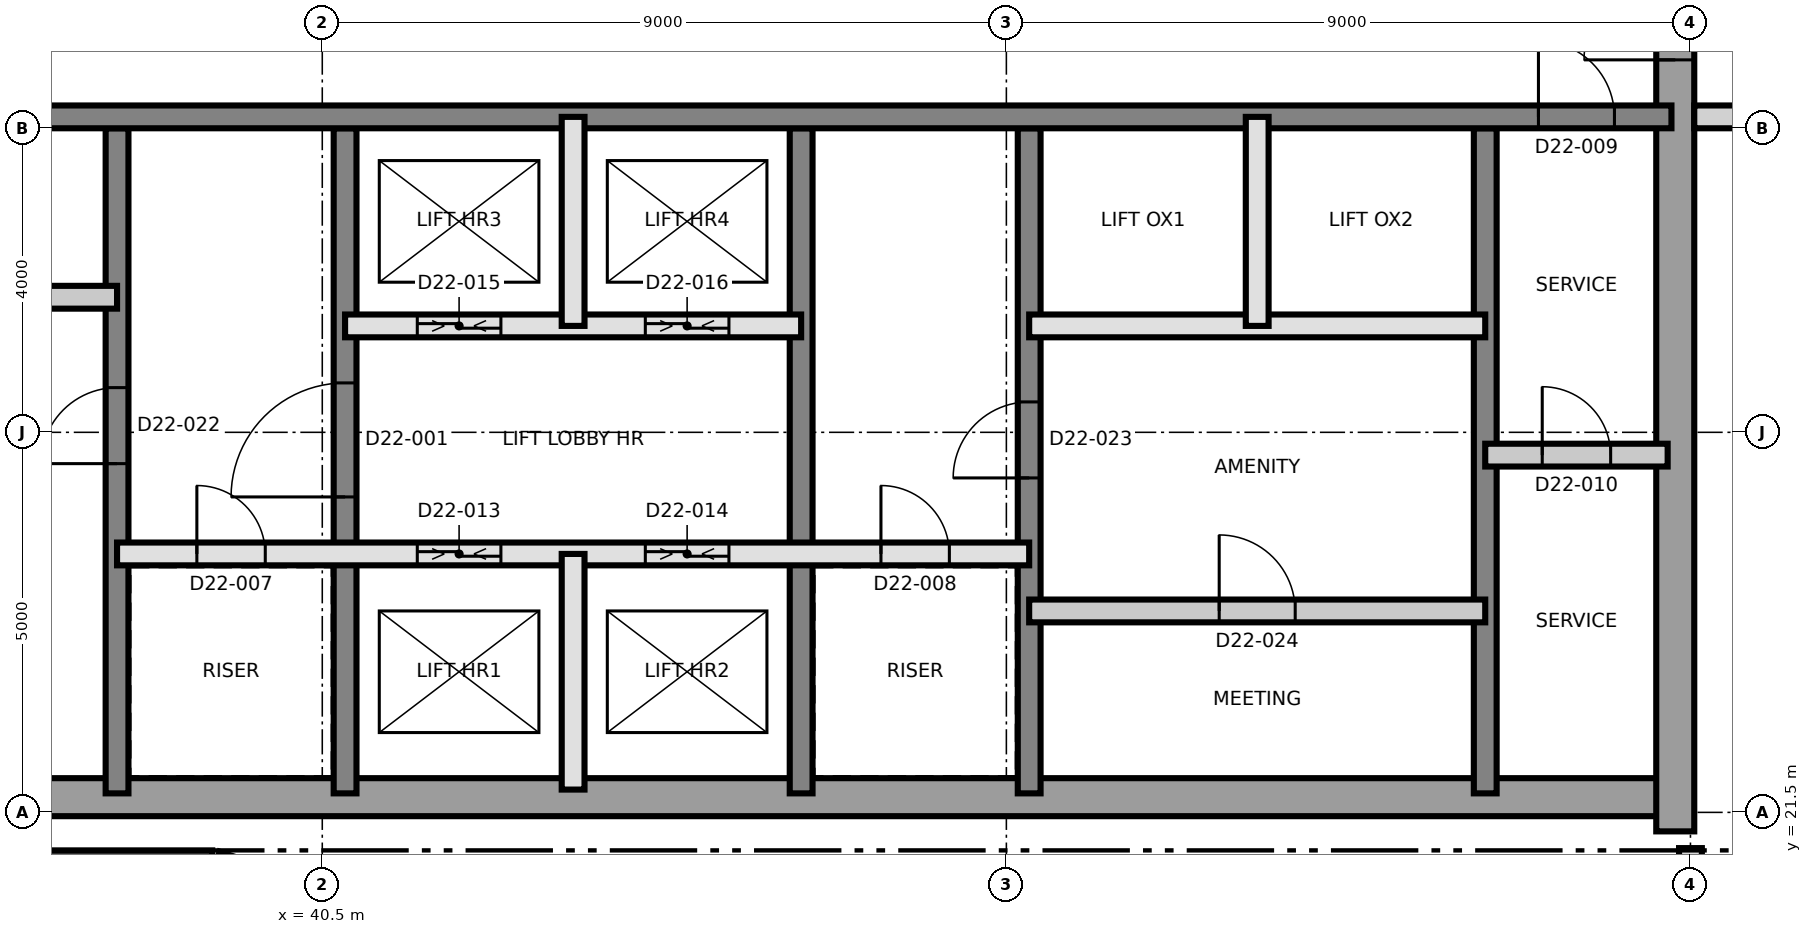
"""IFC4 building model, lengths in metres.
Left out: names, types, materials, properties, quantities, classifications, styles, units other than length and angle.
Written with IfcOpenShell. Run it as: python <this file> out.ifc"""

import sys

from ifc_helpers import new_model, si_unit, direction, frame, frame_2d, origin, place, context, subcontext, project, spatial, rectangle, extrude, element, fill, save


model = new_model("IFC4")
c1 = context("Model", 3, precision=1e-05, world=origin(), true_north=direction((0.0, 1.0)))
c2 = subcontext(c1, "Body", "Model", "MODEL_VIEW")
j1 = project(units=[si_unit("LENGTHUNIT", "METRE"), si_unit("PLANEANGLEUNIT", "RADIAN")], contexts=[c1])
p1 = place(None, origin())
s1 = spatial("IfcSite", under=j1, at=p1, CompositionType="ELEMENT")
p2 = place(p1, origin())
s2 = spatial("IfcBuilding", under=s1, at=p2, CompositionType="ELEMENT")
p3 = place(p2, frame((0.0, 0.0, 199.5)))
s3 = spatial("IfcBuildingStorey", under=s2, at=p3, CompositionType="ELEMENT", Elevation=199.5)
p4 = place(p3, frame((31.25, 21.7, 0.0), z_axis=(0.0, 0.0, 1.0), x_axis=(1.0, 0.0, 0.0)))
e1 = element("IfcWall", 1, at=p4, inside=s3, PredefinedType="SHEAR", context=c2, shape_type="SweptSolid", body=[
    extrude(rectangle(XDim=27.0, YDim=0.5, at=frame_2d((13.5, 0.0))), origin(), (0.0, 0.0, 1.0), 3.7),
])
p5 = place(p3, frame((58.3, 21.25, 0.0), z_axis=(0.0, 0.0, 1.0), x_axis=(0.0, 1.0, 0.0)))
e2 = element("IfcWall", 2, at=p5, inside=s3, PredefinedType="SHEAR", context=c2, shape_type="SweptSolid", body=[
    extrude(rectangle(XDim=18.5, YDim=0.5, at=frame_2d((9.25, 0.0))), origin(), (0.0, 0.0, 1.0), 3.7),
])
p6 = place(p5, frame((10.15, 0.0, 0.0)))
e3 = element("IfcOpeningElement", 3, at=p6, cuts=e2, PredefinedType="OPENING", context=c2, shape_type="SweptSolid", body=[
    extrude(rectangle(XDim=1.2, YDim=2.1, at=frame_2d((0.6, 1.05))), frame((0.0, 0.26, 0.0), z_axis=(0.0, -1.0, 0.0), x_axis=(1.0, 0.0, 0.0)), (0.0, 0.0, 1.0), 0.52),
])
p7 = place(p3, frame((37.8, 21.75, 0.0), z_axis=(0.0, 0.0, 1.0), x_axis=(0.0, 1.0, 0.0)))
e4 = element("IfcWall", 4, at=p7, inside=s3, PredefinedType="SHEAR", context=c2, shape_type="SweptSolid", body=[
    extrude(rectangle(XDim=8.75, YDim=0.3, at=frame_2d((4.375, 0.0))), origin(), (0.0, 0.0, 1.0), 3.7),
])
p8 = place(p7, frame((4.338, 0.0, 0.0)))
e5 = element("IfcOpeningElement", 5, at=p8, cuts=e4, PredefinedType="OPENING", context=c2, shape_type="SweptSolid", body=[
    extrude(rectangle(XDim=1.0, YDim=2.1, at=frame_2d((0.5, 1.05))), frame((0.0, 0.16, 0.0), z_axis=(0.0, -1.0, 0.0), x_axis=(1.0, 0.0, 0.0)), (0.0, 0.0, 1.0), 0.32),
])
p9 = place(p3, frame((40.8, 21.75, 0.0), z_axis=(0.0, 0.0, 1.0), x_axis=(0.0, 1.0, 0.0)))
e6 = element("IfcWall", 6, at=p9, inside=s3, PredefinedType="SHEAR", context=c2, shape_type="SweptSolid", body=[
    extrude(rectangle(XDim=8.75, YDim=0.3, at=frame_2d((4.375, 0.0))), origin(), (0.0, 0.0, 1.0), 3.7),
])
p10 = place(p9, frame((3.9, 0.0, 0.0)))
e7 = element("IfcOpeningElement", 7, at=p10, cuts=e6, PredefinedType="OPENING", context=c2, shape_type="SweptSolid", body=[
    extrude(rectangle(XDim=1.5, YDim=2.1, at=frame_2d((0.75, 1.05))), frame((0.0, 0.16, 0.0), z_axis=(0.0, -1.0, 0.0), x_axis=(1.0, 0.0, 0.0)), (0.0, 0.0, 1.0), 0.32),
])
p11 = place(p3, frame((46.8, 21.75, 0.0), z_axis=(0.0, 0.0, 1.0), x_axis=(0.0, 1.0, 0.0)))
e8 = element("IfcWall", 8, at=p11, inside=s3, PredefinedType="SHEAR", context=c2, shape_type="SweptSolid", body=[
    extrude(rectangle(XDim=8.75, YDim=0.3, at=frame_2d((4.375, 0.0))), origin(), (0.0, 0.0, 1.0), 3.7),
])
p12 = place(p3, frame((49.8, 21.75, 0.0), z_axis=(0.0, 0.0, 1.0), x_axis=(0.0, 1.0, 0.0)))
e9 = element("IfcWall", 9, at=p12, inside=s3, PredefinedType="SHEAR", context=c2, shape_type="SweptSolid", body=[
    extrude(rectangle(XDim=8.75, YDim=0.3, at=frame_2d((4.375, 0.0))), origin(), (0.0, 0.0, 1.0), 3.7),
])
p13 = place(p12, frame((4.15, 0.0, 0.0)))
e10 = element("IfcOpeningElement", 10, at=p13, cuts=e9, PredefinedType="OPENING", context=c2, shape_type="SweptSolid", body=[
    extrude(rectangle(XDim=1.0, YDim=2.1, at=frame_2d((0.5, 1.05))), frame((0.0, 0.16, 0.0), z_axis=(0.0, -1.0, 0.0), x_axis=(1.0, 0.0, 0.0)), (0.0, 0.0, 1.0), 0.32),
])
p14 = place(p3, frame((55.8, 21.75, 0.0), z_axis=(0.0, 0.0, 1.0), x_axis=(0.0, 1.0, 0.0)))
e11 = element("IfcWall", 11, at=p14, inside=s3, PredefinedType="SHEAR", context=c2, shape_type="SweptSolid", body=[
    extrude(rectangle(XDim=8.75, YDim=0.3, at=frame_2d((4.375, 0.0))), origin(), (0.0, 0.0, 1.0), 3.7),
])
p15 = place(p3, frame((31.75, 30.65, 0.0), z_axis=(0.0, 0.0, 1.0), x_axis=(1.0, 0.0, 0.0)))
e12 = element("IfcWall", 12, at=p15, inside=s3, PredefinedType="SHEAR", context=c2, shape_type="SweptSolid", body=[
    extrude(rectangle(XDim=26.5, YDim=0.3, at=frame_2d((13.25, 0.0))), origin(), (0.0, 0.0, 1.0), 3.7),
])
p16 = place(p15, frame((24.75, 0.0, 0.0)))
e13 = element("IfcOpeningElement", 13, at=p16, cuts=e12, PredefinedType="OPENING", context=c2, shape_type="SweptSolid", body=[
    extrude(rectangle(XDim=1.0, YDim=2.1, at=frame_2d((0.5, 1.05))), frame((0.0, 0.16, 0.0), z_axis=(0.0, -1.0, 0.0), x_axis=(1.0, 0.0, 0.0)), (0.0, 0.0, 1.0), 0.32),
])
p17 = place(p15, frame((4.05, 0.0, 0.0)))
e14 = element("IfcOpeningElement", 14, at=p17, cuts=e12, PredefinedType="OPENING", context=c2, shape_type="SweptSolid", body=[
    extrude(rectangle(XDim=1.0, YDim=2.1, at=frame_2d((0.5, 1.05))), frame((0.0, 0.16, 0.0), z_axis=(0.0, -1.0, 0.0), x_axis=(1.0, 0.0, 0.0)), (0.0, 0.0, 1.0), 0.32),
])
p18 = place(p3, frame((31.36, 20.85, 0.0), z_axis=(0.0, 0.0, 1.0), x_axis=(1.0, 0.0, 0.0)))
e15 = element("IfcWall", 15, at=p18, inside=s3, PredefinedType="SOLIDWALL", context=c2, shape_type="SweptSolid", body=[
    extrude(rectangle(XDim=7.693, YDim=0.3, at=frame_2d((3.846, 0.0))), origin(), (0.0, 0.0, 1.0), 3.4),
])
p19 = place(p3, frame((39.101, 20.842, 0.0), z_axis=(0.0, 0.0, 1.0), x_axis=(0.946930456305, -0.32143850255, 0.0)))
e16 = element("IfcWall", 16, at=p19, inside=s3, PredefinedType="SOLIDWALL", context=c2, shape_type="SweptSolid", body=[
    extrude(rectangle(XDim=1.32, YDim=0.3, at=frame_2d((0.66, 0.0))), origin(), (0.0, 0.0, 1.0), 3.4),
])
p20 = place(p3, frame((49.8, 24.15, 0.0), z_axis=(0.0, 0.0, 1.0), x_axis=(1.0, 0.0, 0.0)))
e17 = element("IfcWall", 17, at=p20, inside=s3, PredefinedType="PARTITIONING", context=c2, shape_type="SweptSolid", body=[
    extrude(rectangle(XDim=6.0, YDim=0.3, at=frame_2d((3.0, 0.0))), origin(), (0.0, 0.0, 1.0), 3.4),
])
p21 = place(p20, frame((2.5, 0.0, 0.0)))
e18 = element("IfcOpeningElement", 18, at=p21, cuts=e17, PredefinedType="OPENING", context=c2, shape_type="SweptSolid", body=[
    extrude(rectangle(XDim=1.0, YDim=2.1, at=frame_2d((0.5, 1.05))), frame((0.0, 0.16, 0.0), z_axis=(0.0, -1.0, 0.0), x_axis=(1.0, 0.0, 0.0)), (0.0, 0.0, 1.0), 0.32),
])
p22 = place(p3, frame((37.8, 24.9, 0.0), z_axis=(0.0, 0.0, 1.0), x_axis=(1.0, 0.0, 0.0)))
e19 = element("IfcWall", 19, at=p22, inside=s3, PredefinedType="SOLIDWALL", context=c2, shape_type="SweptSolid", body=[
    extrude(rectangle(XDim=12.0, YDim=0.3, at=frame_2d((6.0, 0.0))), origin(), (0.0, 0.0, 1.0), 3.4),
])
p23 = place(p22, frame((1.05, 0.0, 0.0)))
e20 = element("IfcOpeningElement", 20, at=p23, cuts=e19, PredefinedType="OPENING", context=c2, shape_type="SweptSolid", body=[
    extrude(rectangle(XDim=0.9, YDim=2.1, at=frame_2d((0.45, 1.05))), frame((0.0, 0.16, 0.0), z_axis=(0.0, -1.0, 0.0), x_axis=(1.0, 0.0, 0.0)), (0.0, 0.0, 1.0), 0.32),
])
p24 = place(p22, frame((10.05, 0.0, 0.0)))
e21 = element("IfcOpeningElement", 21, at=p24, cuts=e19, PredefinedType="OPENING", context=c2, shape_type="SweptSolid", body=[
    extrude(rectangle(XDim=0.9, YDim=2.1, at=frame_2d((0.45, 1.05))), frame((0.0, 0.16, 0.0), z_axis=(0.0, -1.0, 0.0), x_axis=(1.0, 0.0, 0.0)), (0.0, 0.0, 1.0), 0.32),
])
p25 = place(p22, frame((3.95, 0.0, 0.0)))
e22 = element("IfcOpeningElement", 22, at=p25, cuts=e19, PredefinedType="OPENING", context=c2, shape_type="SweptSolid", body=[
    extrude(rectangle(XDim=1.1, YDim=2.4, at=frame_2d((0.55, 1.2))), frame((0.0, 0.16, 0.0), z_axis=(0.0, -1.0, 0.0), x_axis=(1.0, 0.0, 0.0)), (0.0, 0.0, 1.0), 0.32),
])
p26 = place(p22, frame((6.95, 0.0, 0.0)))
e23 = element("IfcOpeningElement", 23, at=p26, cuts=e19, PredefinedType="OPENING", context=c2, shape_type="SweptSolid", body=[
    extrude(rectangle(XDim=1.1, YDim=2.4, at=frame_2d((0.55, 1.2))), frame((0.0, 0.16, 0.0), z_axis=(0.0, -1.0, 0.0), x_axis=(1.0, 0.0, 0.0)), (0.0, 0.0, 1.0), 0.32),
])
p27 = place(p3, frame((55.8, 26.2, 0.0), z_axis=(0.0, 0.0, 1.0), x_axis=(1.0, 0.0, 0.0)))
e24 = element("IfcWall", 24, at=p27, inside=s3, PredefinedType="PARTITIONING", context=c2, shape_type="SweptSolid", body=[
    extrude(rectangle(XDim=2.4, YDim=0.3, at=frame_2d((1.2, 0.0))), origin(), (0.0, 0.0, 1.0), 3.4),
])
p28 = place(p27, frame((0.75, 0.0, 0.0)))
e25 = element("IfcOpeningElement", 25, at=p28, cuts=e24, PredefinedType="OPENING", context=c2, shape_type="SweptSolid", body=[
    extrude(rectangle(XDim=0.9, YDim=2.1, at=frame_2d((0.45, 1.05))), frame((0.0, 0.16, 0.0), z_axis=(0.0, -1.0, 0.0), x_axis=(1.0, 0.0, 0.0)), (0.0, 0.0, 1.0), 0.32),
])
p29 = place(p3, frame((40.8, 27.9, 0.0), z_axis=(0.0, 0.0, 1.0), x_axis=(1.0, 0.0, 0.0)))
e26 = element("IfcWall", 26, at=p29, inside=s3, PredefinedType="SOLIDWALL", context=c2, shape_type="SweptSolid", body=[
    extrude(rectangle(XDim=6.0, YDim=0.3, at=frame_2d((3.0, 0.0))), origin(), (0.0, 0.0, 1.0), 3.4),
])
p30 = place(p29, frame((0.95, 0.0, 0.0)))
e27 = element("IfcOpeningElement", 27, at=p30, cuts=e26, PredefinedType="OPENING", context=c2, shape_type="SweptSolid", body=[
    extrude(rectangle(XDim=1.1, YDim=2.4, at=frame_2d((0.55, 1.2))), frame((0.0, 0.16, 0.0), z_axis=(0.0, -1.0, 0.0), x_axis=(1.0, 0.0, 0.0)), (0.0, 0.0, 1.0), 0.32),
])
p31 = place(p29, frame((3.95, 0.0, 0.0)))
e28 = element("IfcOpeningElement", 28, at=p31, cuts=e26, PredefinedType="OPENING", context=c2, shape_type="SweptSolid", body=[
    extrude(rectangle(XDim=1.1, YDim=2.4, at=frame_2d((0.55, 1.2))), frame((0.0, 0.16, 0.0), z_axis=(0.0, -1.0, 0.0), x_axis=(1.0, 0.0, 0.0)), (0.0, 0.0, 1.0), 0.32),
])
p32 = place(p3, frame((49.8, 27.9, 0.0), z_axis=(0.0, 0.0, 1.0), x_axis=(1.0, 0.0, 0.0)))
e29 = element("IfcWall", 29, at=p32, inside=s3, PredefinedType="SOLIDWALL", context=c2, shape_type="SweptSolid", body=[
    extrude(rectangle(XDim=6.0, YDim=0.3, at=frame_2d((3.0, 0.0))), origin(), (0.0, 0.0, 1.0), 3.4),
])
p33 = place(p3, frame((31.8, 28.277, 0.0), z_axis=(0.0, 0.0, 1.0), x_axis=(1.0, 0.0, 0.0)))
e30 = element("IfcWall", 30, at=p33, inside=s3, PredefinedType="PARTITIONING", context=c2, shape_type="SweptSolid", body=[
    extrude(rectangle(XDim=6.0, YDim=0.3, at=frame_2d((3.0, 0.0))), origin(), (0.0, 0.0, 1.0), 3.4),
])
p34 = place(p3, frame((43.8, 21.8, 0.0), z_axis=(0.0, 0.0, 1.0), x_axis=(0.0, 1.0, 0.0)))
e31 = element("IfcWall", 31, at=p34, inside=s3, PredefinedType="SOLIDWALL", context=c2, shape_type="SweptSolid", body=[
    extrude(rectangle(XDim=3.1, YDim=0.3, at=frame_2d((1.55, 0.0))), origin(), (0.0, 0.0, 1.0), 3.4),
])
for number, where, z_axis, x_axis in (
    (32, (43.8, 27.9, 0.0), (0.0, 0.0, 1.0), (0.0, 1.0, 0.0)),
    (33, (52.8, 27.9, 0.0), (0.0, 0.0, 1.0), (0.0, 1.0, 0.0)),
):
    element("IfcWall", number, at=place(p3, frame(where, z_axis=z_axis, x_axis=x_axis)), inside=s3, PredefinedType="SOLIDWALL", context=c2, shape_type="SweptSolid", body=[
        extrude(rectangle(XDim=2.75, YDim=0.3, at=frame_2d((1.375, 0.0))), origin(), (0.0, 0.0, 1.0), 3.4),
    ])
p35 = place(p3, frame((58.55, 30.65, 0.0), z_axis=(0.0, 0.0, 1.0), x_axis=(1.0, 0.0, 0.0)))
e34 = element("IfcWall", 34, at=p35, inside=s3, PredefinedType="PARTITIONING", context=c2, shape_type="SweptSolid", body=[
    extrude(rectangle(XDim=26.78, YDim=0.3, at=frame_2d((13.39, 0.0))), origin(), (0.0, 0.0, 1.0), 3.4),
])
p36 = place(p35, frame((1.65, 0.0, 0.0)))
e35 = element("IfcOpeningElement", 35, at=p36, cuts=e34, PredefinedType="OPENING", context=c2, shape_type="SweptSolid", body=[
    extrude(rectangle(XDim=1.2, YDim=2.1, at=frame_2d((0.6, 1.05))), frame((0.0, 0.16, 0.0), z_axis=(0.0, -1.0, 0.0), x_axis=(1.0, 0.0, 0.0)), (0.0, 0.0, 1.0), 0.32),
])
p37 = place(p35, frame((4.9, 0.0, 0.0)))
e36 = element("IfcOpeningElement", 36, at=p37, cuts=e34, PredefinedType="OPENING", context=c2, shape_type="SweptSolid", body=[
    extrude(rectangle(XDim=1.0, YDim=2.1, at=frame_2d((0.5, 1.05))), frame((0.0, 0.16, 0.0), z_axis=(0.0, -1.0, 0.0), x_axis=(1.0, 0.0, 0.0)), (0.0, 0.0, 1.0), 0.32),
])
p38 = place(p35, frame((10.085, 0.0, 0.0)))
e37 = element("IfcOpeningElement", 37, at=p38, cuts=e34, PredefinedType="OPENING", context=c2, shape_type="SweptSolid", body=[
    extrude(rectangle(XDim=1.2, YDim=2.1, at=frame_2d((0.6, 1.05))), frame((0.0, 0.16, 0.0), z_axis=(0.0, -1.0, 0.0), x_axis=(1.0, 0.0, 0.0)), (0.0, 0.0, 1.0), 0.32),
])
p39 = place(p35, frame((13.335, 0.0, 0.0)))
e38 = element("IfcOpeningElement", 38, at=p39, cuts=e34, PredefinedType="OPENING", context=c2, shape_type="SweptSolid", body=[
    extrude(rectangle(XDim=1.0, YDim=2.1, at=frame_2d((0.5, 1.05))), frame((0.0, 0.16, 0.0), z_axis=(0.0, -1.0, 0.0), x_axis=(1.0, 0.0, 0.0)), (0.0, 0.0, 1.0), 0.32),
])
p40 = place(p35, frame((19.085, 0.0, 0.0)))
e39 = element("IfcOpeningElement", 39, at=p40, cuts=e34, PredefinedType="OPENING", context=c2, shape_type="SweptSolid", body=[
    extrude(rectangle(XDim=1.2, YDim=2.1, at=frame_2d((0.6, 1.05))), frame((0.0, 0.16, 0.0), z_axis=(0.0, -1.0, 0.0), x_axis=(1.0, 0.0, 0.0)), (0.0, 0.0, 1.0), 0.32),
])
p41 = place(p35, frame((22.335, 0.0, 0.0)))
e40 = element("IfcOpeningElement", 40, at=p41, cuts=e34, PredefinedType="OPENING", context=c2, shape_type="SweptSolid", body=[
    extrude(rectangle(XDim=1.0, YDim=2.1, at=frame_2d((0.5, 1.05))), frame((0.0, 0.16, 0.0), z_axis=(0.0, -1.0, 0.0), x_axis=(1.0, 0.0, 0.0)), (0.0, 0.0, 1.0), 0.32),
])
p42 = place(p3, frame((58.5, 20.135, 0.0), z_axis=(0.0, 0.0, 1.0), x_axis=(0.0, 1.0, 0.0)))
e41 = element("IfcWall", 41, at=p42, inside=s3, PredefinedType="PARTITIONING", context=c2, shape_type="SweptSolid", body=[
    extrude(rectangle(XDim=0.895, YDim=0.3, at=frame_2d((0.448, 0.0))), origin(), (0.0, 0.0, 1.0), 3.4),
])
p43 = place(p10, origin())
e42 = element("IfcDoor", 42, at=p43, inside=s3, OperationType="SINGLE_SWING_RIGHT", PredefinedType="DOOR", context=c2, shape_type="SweptSolid", body=[
    extrude(rectangle(XDim=1.5, YDim=2.1, at=frame_2d((0.75, 1.05))), frame((0.0, 0.025, 0.0), z_axis=(0.0, -1.0, 0.0), x_axis=(1.0, 0.0, 0.0)), (0.0, 0.0, 1.0), 0.05),
])
fill(e7, e42)
p44 = place(p23, origin())
e43 = element("IfcDoor", 43, at=p44, inside=s3, OperationType="SINGLE_SWING_LEFT", PredefinedType="DOOR", context=c2, shape_type="SweptSolid", body=[
    extrude(rectangle(XDim=0.9, YDim=2.1, at=frame_2d((0.45, 1.05))), frame((0.0, 0.025, 0.0), z_axis=(0.0, -1.0, 0.0), x_axis=(1.0, 0.0, 0.0)), (0.0, 0.0, 1.0), 0.05),
])
fill(e20, e43)
p45 = place(p24, origin())
e44 = element("IfcDoor", 44, at=p45, inside=s3, OperationType="SINGLE_SWING_RIGHT", PredefinedType="DOOR", context=c2, shape_type="SweptSolid", body=[
    extrude(rectangle(XDim=0.9, YDim=2.1, at=frame_2d((0.45, 1.05))), frame((0.0, 0.025, 0.0), z_axis=(0.0, -1.0, 0.0), x_axis=(1.0, 0.0, 0.0)), (0.0, 0.0, 1.0), 0.05),
])
fill(e21, e44)
p46 = place(p16, origin())
e45 = element("IfcDoor", 45, at=p46, inside=s3, OperationType="SINGLE_SWING_LEFT", PredefinedType="DOOR", context=c2, shape_type="SweptSolid", body=[
    extrude(rectangle(XDim=1.0, YDim=2.1, at=frame_2d((0.5, 1.05))), frame((0.0, 0.025, 0.0), z_axis=(0.0, -1.0, 0.0), x_axis=(1.0, 0.0, 0.0)), (0.0, 0.0, 1.0), 0.05),
])
fill(e13, e45)
p47 = place(p28, origin())
e46 = element("IfcDoor", 46, at=p47, inside=s3, OperationType="SINGLE_SWING_RIGHT", PredefinedType="DOOR", context=c2, shape_type="SweptSolid", body=[
    extrude(rectangle(XDim=0.9, YDim=2.1, at=frame_2d((0.45, 1.05))), frame((0.0, 0.025, 0.0), z_axis=(0.0, -1.0, 0.0), x_axis=(1.0, 0.0, 0.0)), (0.0, 0.0, 1.0), 0.05),
])
fill(e25, e46)
p48 = place(p6, origin())
e47 = element("IfcDoor", 47, at=p48, inside=s3, OperationType="SINGLE_SWING_LEFT", PredefinedType="DOOR", context=c2, shape_type="SweptSolid", body=[
    extrude(rectangle(XDim=1.2, YDim=2.1, at=frame_2d((0.6, 1.05))), frame((0.0, 0.025, 0.0), z_axis=(0.0, -1.0, 0.0), x_axis=(1.0, 0.0, 0.0)), (0.0, 0.0, 1.0), 0.05),
])
fill(e3, e47)
p49 = place(p25, origin())
e48 = element("IfcDoor", 48, at=p49, inside=s3, OperationType="SLIDING_TO_LEFT", PredefinedType="DOOR", context=c2, shape_type="SweptSolid", body=[
    extrude(rectangle(XDim=1.1, YDim=2.4, at=frame_2d((0.55, 1.2))), frame((0.0, 0.025, 0.0), z_axis=(0.0, -1.0, 0.0), x_axis=(1.0, 0.0, 0.0)), (0.0, 0.0, 1.0), 0.05),
])
fill(e22, e48)
p50 = place(p26, origin())
e49 = element("IfcDoor", 49, at=p50, inside=s3, OperationType="SLIDING_TO_LEFT", PredefinedType="DOOR", context=c2, shape_type="SweptSolid", body=[
    extrude(rectangle(XDim=1.1, YDim=2.4, at=frame_2d((0.55, 1.2))), frame((0.0, 0.025, 0.0), z_axis=(0.0, -1.0, 0.0), x_axis=(1.0, 0.0, 0.0)), (0.0, 0.0, 1.0), 0.05),
])
fill(e23, e49)
p51 = place(p30, origin())
e50 = element("IfcDoor", 50, at=p51, inside=s3, OperationType="SLIDING_TO_LEFT", PredefinedType="DOOR", context=c2, shape_type="SweptSolid", body=[
    extrude(rectangle(XDim=1.1, YDim=2.4, at=frame_2d((0.55, 1.2))), frame((0.0, 0.025, 0.0), z_axis=(0.0, -1.0, 0.0), x_axis=(1.0, 0.0, 0.0)), (0.0, 0.0, 1.0), 0.05),
])
fill(e27, e50)
p52 = place(p31, origin())
e51 = element("IfcDoor", 51, at=p52, inside=s3, OperationType="SLIDING_TO_LEFT", PredefinedType="DOOR", context=c2, shape_type="SweptSolid", body=[
    extrude(rectangle(XDim=1.1, YDim=2.4, at=frame_2d((0.55, 1.2))), frame((0.0, 0.025, 0.0), z_axis=(0.0, -1.0, 0.0), x_axis=(1.0, 0.0, 0.0)), (0.0, 0.0, 1.0), 0.05),
])
fill(e28, e51)
p53 = place(p8, origin())
e52 = element("IfcDoor", 52, at=p53, inside=s3, OperationType="SINGLE_SWING_RIGHT", PredefinedType="DOOR", context=c2, shape_type="SweptSolid", body=[
    extrude(rectangle(XDim=1.0, YDim=2.1, at=frame_2d((0.5, 1.05))), frame((0.0, 0.025, 0.0), z_axis=(0.0, -1.0, 0.0), x_axis=(1.0, 0.0, 0.0)), (0.0, 0.0, 1.0), 0.05),
])
fill(e5, e52)
p54 = place(p13, origin())
e53 = element("IfcDoor", 53, at=p54, inside=s3, OperationType="SINGLE_SWING_LEFT", PredefinedType="DOOR", context=c2, shape_type="SweptSolid", body=[
    extrude(rectangle(XDim=1.0, YDim=2.1, at=frame_2d((0.5, 1.05))), frame((0.0, 0.025, 0.0), z_axis=(0.0, -1.0, 0.0), x_axis=(1.0, 0.0, 0.0)), (0.0, 0.0, 1.0), 0.05),
])
fill(e10, e53)
p55 = place(p21, origin())
e54 = element("IfcDoor", 54, at=p55, inside=s3, OperationType="SINGLE_SWING_RIGHT", PredefinedType="DOOR", context=c2, shape_type="SweptSolid", body=[
    extrude(rectangle(XDim=1.0, YDim=2.1, at=frame_2d((0.5, 1.05))), frame((0.0, 0.025, 0.0), z_axis=(0.0, -1.0, 0.0), x_axis=(1.0, 0.0, 0.0)), (0.0, 0.0, 1.0), 0.05),
])
fill(e18, e54)
save(model, sys.argv[1])
